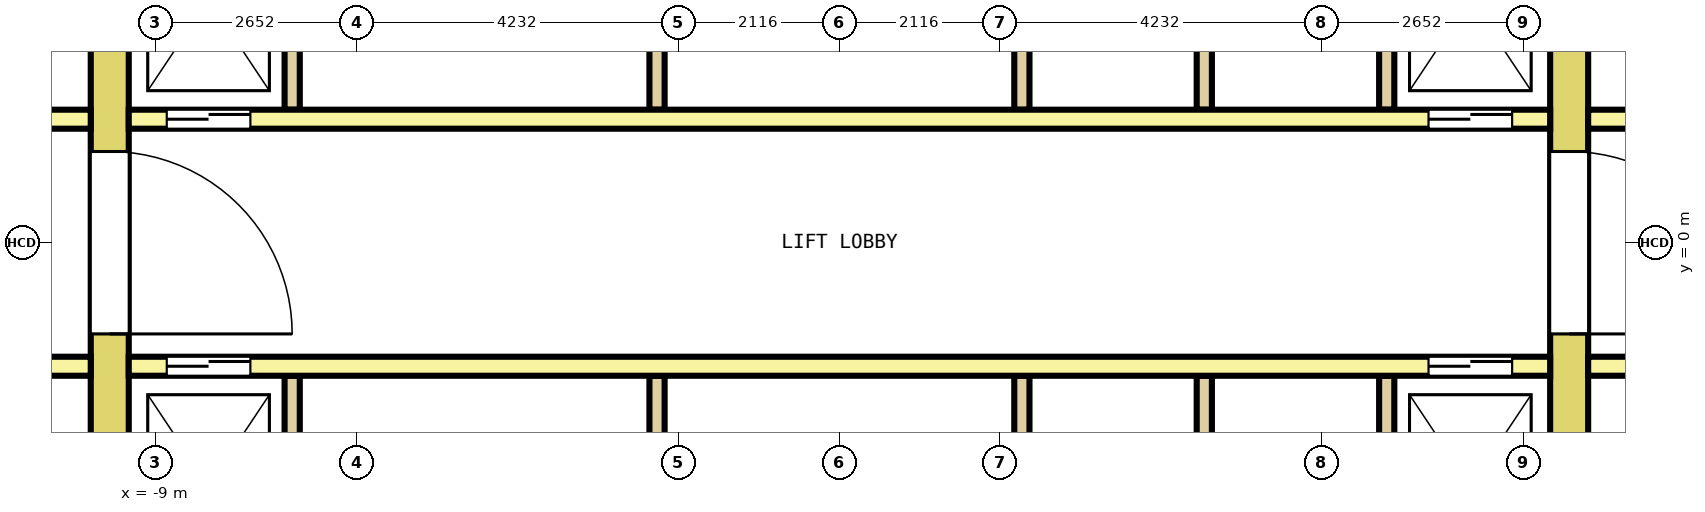
"""IFC4 building model, lengths in metres.
Left out: names, types, materials, properties, quantities, classifications, styles, units other than length and angle.
Written with IfcOpenShell. Run it as: python <this file> out.ifc"""

import sys

from ifc_helpers import new_model, si_unit, direction, frame, frame_2d, origin, place, context, subcontext, project, spatial, rectangle, extrude, element, fill, save


model = new_model("IFC4")
c1 = context("Model", 3, precision=1e-05, world=origin(), true_north=direction((0.0, 1.0)))
c2 = subcontext(c1, "Body", "Model", "MODEL_VIEW")
j1 = project(units=[si_unit("LENGTHUNIT", "METRE"), si_unit("PLANEANGLEUNIT", "RADIAN")], contexts=[c1])
p1 = place(None, origin())
s1 = spatial("IfcSite", under=j1, at=p1, CompositionType="ELEMENT")
p2 = place(p1, origin())
s2 = spatial("IfcBuilding", under=s1, at=p2, CompositionType="ELEMENT")
p3 = place(p2, frame((0.0, 0.0, 102.8)))
s3 = spatial("IfcBuildingStorey", under=s2, at=p3, CompositionType="ELEMENT", Elevation=102.8)
p4 = place(p3, frame((-9.6, -7.7, 0.0), z_axis=(0.0, 0.0, 1.0), x_axis=(0.0, 1.0, 0.0)))
e1 = element("IfcWall", 1, at=p4, inside=s3, PredefinedType="SHEAR", context=c2, shape_type="SweptSolid", body=[
    extrude(rectangle(XDim=15.4, YDim=0.5, at=frame_2d((7.7, 0.0))), origin(), (0.0, 0.0, 1.0), 4.1),
])
p5 = place(p4, frame((6.5, 0.0, 0.0)))
e2 = element("IfcOpeningElement", 2, at=p5, cuts=e1, PredefinedType="OPENING", context=c2, shape_type="SweptSolid", body=[
    extrude(rectangle(XDim=2.4, YDim=2.1, at=frame_2d((1.2, 1.05))), frame((0.0, 0.26, 0.0), z_axis=(0.0, -1.0, 0.0), x_axis=(1.0, 0.0, 0.0)), (0.0, 0.0, 1.0), 0.52),
])
p6 = place(p4, frame((13.4, 0.0, 0.0)))
e3 = element("IfcOpeningElement", 3, at=p6, cuts=e1, PredefinedType="OPENING", context=c2, shape_type="SweptSolid", body=[
    extrude(rectangle(XDim=1.2, YDim=2.1, at=frame_2d((0.6, 1.05))), frame((0.0, 0.26, 0.0), z_axis=(0.0, -1.0, 0.0), x_axis=(1.0, 0.0, 0.0)), (0.0, 0.0, 1.0), 0.52),
])
p7 = place(p4, frame((0.8, 0.0, 0.0)))
e4 = element("IfcOpeningElement", 4, at=p7, cuts=e1, PredefinedType="OPENING", context=c2, shape_type="SweptSolid", body=[
    extrude(rectangle(XDim=1.2, YDim=2.1, at=frame_2d((0.6, 1.05))), frame((0.0, 0.26, 0.0), z_axis=(0.0, -1.0, 0.0), x_axis=(1.0, 0.0, 0.0)), (0.0, 0.0, 1.0), 0.52),
])
p8 = place(p3, frame((9.6, -7.7, 0.0), z_axis=(0.0, 0.0, 1.0), x_axis=(0.0, 1.0, 0.0)))
e5 = element("IfcWall", 5, at=p8, inside=s3, PredefinedType="SHEAR", context=c2, shape_type="SweptSolid", body=[
    extrude(rectangle(XDim=15.4, YDim=0.5, at=frame_2d((7.7, 0.0))), origin(), (0.0, 0.0, 1.0), 4.1),
])
p9 = place(p8, frame((6.5, 0.0, 0.0)))
e6 = element("IfcOpeningElement", 6, at=p9, cuts=e5, PredefinedType="OPENING", context=c2, shape_type="SweptSolid", body=[
    extrude(rectangle(XDim=2.4, YDim=2.1, at=frame_2d((1.2, 1.05))), frame((0.0, 0.26, 0.0), z_axis=(0.0, -1.0, 0.0), x_axis=(1.0, 0.0, 0.0)), (0.0, 0.0, 1.0), 0.52),
])
p10 = place(p8, frame((13.4, 0.0, 0.0)))
e7 = element("IfcOpeningElement", 7, at=p10, cuts=e5, PredefinedType="OPENING", context=c2, shape_type="SweptSolid", body=[
    extrude(rectangle(XDim=1.2, YDim=2.1, at=frame_2d((0.6, 1.05))), frame((0.0, 0.26, 0.0), z_axis=(0.0, -1.0, 0.0), x_axis=(1.0, 0.0, 0.0)), (0.0, 0.0, 1.0), 0.52),
])
p11 = place(p8, frame((0.9, 0.0, 0.0)))
e8 = element("IfcOpeningElement", 8, at=p11, cuts=e5, PredefinedType="OPENING", context=c2, shape_type="SweptSolid", body=[
    extrude(rectangle(XDim=1.0, YDim=2.1, at=frame_2d((0.5, 1.05))), frame((0.0, 0.26, 0.0), z_axis=(0.0, -1.0, 0.0), x_axis=(1.0, 0.0, 0.0)), (0.0, 0.0, 1.0), 0.52),
])
p12 = place(p3, frame((-12.8, 1.625, 0.0), z_axis=(0.0, 0.0, 1.0), x_axis=(1.0, 0.0, 0.0)))
e9 = element("IfcWall", 9, at=p12, inside=s3, PredefinedType="SOLIDWALL", context=c2, shape_type="SweptSolid", body=[
    extrude(rectangle(XDim=2.95, YDim=0.25, at=frame_2d((1.475, 0.0))), origin(), (0.0, 0.0, 1.0), 4.1),
])
p13 = place(p12, frame((0.925, 0.0, 0.0)))
e10 = element("IfcOpeningElement", 10, at=p13, cuts=e9, PredefinedType="OPENING", context=c2, shape_type="SweptSolid", body=[
    extrude(rectangle(XDim=1.1, YDim=2.1, at=frame_2d((0.55, 1.05))), frame((0.0, 0.135, 0.0), z_axis=(0.0, -1.0, 0.0), x_axis=(1.0, 0.0, 0.0)), (0.0, 0.0, 1.0), 0.27),
])
p14 = place(p3, frame((-9.35, 1.625, 0.0), z_axis=(0.0, 0.0, 1.0), x_axis=(1.0, 0.0, 0.0)))
e11 = element("IfcWall", 11, at=p14, inside=s3, PredefinedType="SOLIDWALL", context=c2, shape_type="SweptSolid", body=[
    extrude(rectangle(XDim=18.7, YDim=0.25, at=frame_2d((9.35, 0.0))), origin(), (0.0, 0.0, 1.0), 4.1),
])
p15 = place(p14, frame((0.5, 0.0, 0.0)))
e12 = element("IfcOpeningElement", 12, at=p15, cuts=e11, PredefinedType="OPENING", context=c2, shape_type="SweptSolid", body=[
    extrude(rectangle(XDim=1.1, YDim=2.1, at=frame_2d((0.55, 1.05))), frame((0.0, 0.135, 0.0), z_axis=(0.0, -1.0, 0.0), x_axis=(1.0, 0.0, 0.0)), (0.0, 0.0, 1.0), 0.27),
])
p16 = place(p14, frame((17.1, 0.0, 0.0)))
e13 = element("IfcOpeningElement", 13, at=p16, cuts=e11, PredefinedType="OPENING", context=c2, shape_type="SweptSolid", body=[
    extrude(rectangle(XDim=1.1, YDim=2.1, at=frame_2d((0.55, 1.05))), frame((0.0, 0.135, 0.0), z_axis=(0.0, -1.0, 0.0), x_axis=(1.0, 0.0, 0.0)), (0.0, 0.0, 1.0), 0.27),
])
p17 = place(p3, frame((9.85, 1.625, 0.0), z_axis=(0.0, 0.0, 1.0), x_axis=(1.0, 0.0, 0.0)))
e14 = element("IfcWall", 14, at=p17, inside=s3, PredefinedType="SOLIDWALL", context=c2, shape_type="SweptSolid", body=[
    extrude(rectangle(XDim=2.95, YDim=0.25, at=frame_2d((1.475, 0.0))), origin(), (0.0, 0.0, 1.0), 4.1),
])
p18 = place(p17, frame((0.925, 0.0, 0.0)))
e15 = element("IfcOpeningElement", 15, at=p18, cuts=e14, PredefinedType="OPENING", context=c2, shape_type="SweptSolid", body=[
    extrude(rectangle(XDim=1.1, YDim=2.1, at=frame_2d((0.55, 1.05))), frame((0.0, 0.135, 0.0), z_axis=(0.0, -1.0, 0.0), x_axis=(1.0, 0.0, 0.0)), (0.0, 0.0, 1.0), 0.27),
])
for number, where, z_axis, x_axis in (
    (16, (-7.2, 1.75, 0.0), (0.0, 0.0, 1.0), (0.0, 1.0, 0.0)),
    (17, (-2.4, 1.75, 0.0), (0.0, 0.0, 1.0), (0.0, 1.0, 0.0)),
    (18, (2.4, 1.75, 0.0), (0.0, 0.0, 1.0), (0.0, 1.0, 0.0)),
    (19, (4.8, 1.75, 0.0), (0.0, 0.0, 1.0), (0.0, 1.0, 0.0)),
    (20, (7.2, 1.75, 0.0), (0.0, 0.0, 1.0), (0.0, 1.0, 0.0)),
):
    element("IfcWall", number, at=place(p3, frame(where, z_axis=z_axis, x_axis=x_axis)), inside=s3, PredefinedType="SOLIDWALL", context=c2, shape_type="SweptSolid", body=[
        extrude(rectangle(XDim=2.9, YDim=0.2, at=frame_2d((1.45, 0.0))), origin(), (0.0, 0.0, 1.0), 4.1),
    ])
p19 = place(p3, frame((-12.8, -1.625, 0.0), z_axis=(0.0, 0.0, 1.0), x_axis=(1.0, 0.0, 0.0)))
e21 = element("IfcWall", 21, at=p19, inside=s3, PredefinedType="SOLIDWALL", context=c2, shape_type="SweptSolid", body=[
    extrude(rectangle(XDim=2.95, YDim=0.25, at=frame_2d((1.475, 0.0))), origin(), (0.0, 0.0, 1.0), 4.1),
])
p20 = place(p19, frame((0.925, 0.0, 0.0)))
e22 = element("IfcOpeningElement", 22, at=p20, cuts=e21, PredefinedType="OPENING", context=c2, shape_type="SweptSolid", body=[
    extrude(rectangle(XDim=1.1, YDim=2.1, at=frame_2d((0.55, 1.05))), frame((0.0, 0.135, 0.0), z_axis=(0.0, -1.0, 0.0), x_axis=(1.0, 0.0, 0.0)), (0.0, 0.0, 1.0), 0.27),
])
p21 = place(p3, frame((-9.35, -1.625, 0.0), z_axis=(0.0, 0.0, 1.0), x_axis=(1.0, 0.0, 0.0)))
e23 = element("IfcWall", 23, at=p21, inside=s3, PredefinedType="SOLIDWALL", context=c2, shape_type="SweptSolid", body=[
    extrude(rectangle(XDim=18.7, YDim=0.25, at=frame_2d((9.35, 0.0))), origin(), (0.0, 0.0, 1.0), 4.1),
])
p22 = place(p21, frame((0.5, 0.0, 0.0)))
e24 = element("IfcOpeningElement", 24, at=p22, cuts=e23, PredefinedType="OPENING", context=c2, shape_type="SweptSolid", body=[
    extrude(rectangle(XDim=1.1, YDim=2.1, at=frame_2d((0.55, 1.05))), frame((0.0, 0.135, 0.0), z_axis=(0.0, -1.0, 0.0), x_axis=(1.0, 0.0, 0.0)), (0.0, 0.0, 1.0), 0.27),
])
p23 = place(p21, frame((17.1, 0.0, 0.0)))
e25 = element("IfcOpeningElement", 25, at=p23, cuts=e23, PredefinedType="OPENING", context=c2, shape_type="SweptSolid", body=[
    extrude(rectangle(XDim=1.1, YDim=2.1, at=frame_2d((0.55, 1.05))), frame((0.0, 0.135, 0.0), z_axis=(0.0, -1.0, 0.0), x_axis=(1.0, 0.0, 0.0)), (0.0, 0.0, 1.0), 0.27),
])
p24 = place(p3, frame((9.85, -1.625, 0.0), z_axis=(0.0, 0.0, 1.0), x_axis=(1.0, 0.0, 0.0)))
e26 = element("IfcWall", 26, at=p24, inside=s3, PredefinedType="SOLIDWALL", context=c2, shape_type="SweptSolid", body=[
    extrude(rectangle(XDim=2.95, YDim=0.25, at=frame_2d((1.475, 0.0))), origin(), (0.0, 0.0, 1.0), 4.1),
])
p25 = place(p24, frame((0.925, 0.0, 0.0)))
e27 = element("IfcOpeningElement", 27, at=p25, cuts=e26, PredefinedType="OPENING", context=c2, shape_type="SweptSolid", body=[
    extrude(rectangle(XDim=1.1, YDim=2.1, at=frame_2d((0.55, 1.05))), frame((0.0, 0.135, 0.0), z_axis=(0.0, -1.0, 0.0), x_axis=(1.0, 0.0, 0.0)), (0.0, 0.0, 1.0), 0.27),
])
for number, where, z_axis, x_axis in (
    (28, (-7.2, -4.65, 0.0), (0.0, 0.0, 1.0), (0.0, 1.0, 0.0)),
    (29, (-2.4, -4.65, 0.0), (0.0, 0.0, 1.0), (0.0, 1.0, 0.0)),
    (30, (2.4, -4.65, 0.0), (0.0, 0.0, 1.0), (0.0, 1.0, 0.0)),
    (31, (4.8, -4.65, 0.0), (0.0, 0.0, 1.0), (0.0, 1.0, 0.0)),
    (32, (7.2, -4.65, 0.0), (0.0, 0.0, 1.0), (0.0, 1.0, 0.0)),
):
    element("IfcWall", number, at=place(p3, frame(where, z_axis=z_axis, x_axis=x_axis)), inside=s3, PredefinedType="SOLIDWALL", context=c2, shape_type="SweptSolid", body=[
        extrude(rectangle(XDim=2.9, YDim=0.2, at=frame_2d((1.45, 0.0))), origin(), (0.0, 0.0, 1.0), 4.1),
    ])
p26 = place(p15, origin())
e33 = element("IfcDoor", 33, at=p26, inside=s3, OperationType="DOUBLE_DOOR_SLIDING", PredefinedType="DOOR", context=c2, shape_type="SweptSolid", body=[
    extrude(rectangle(XDim=1.1, YDim=2.1, at=frame_2d((0.55, 1.05))), frame((0.0, 0.075, 0.0), z_axis=(0.0, -1.0, 0.0), x_axis=(1.0, 0.0, 0.0)), (0.0, 0.0, 1.0), 0.15),
])
fill(e12, e33)
p27 = place(p16, origin())
e34 = element("IfcDoor", 34, at=p27, inside=s3, OperationType="DOUBLE_DOOR_SLIDING", PredefinedType="DOOR", context=c2, shape_type="SweptSolid", body=[
    extrude(rectangle(XDim=1.1, YDim=2.1, at=frame_2d((0.55, 1.05))), frame((0.0, 0.075, 0.0), z_axis=(0.0, -1.0, 0.0), x_axis=(1.0, 0.0, 0.0)), (0.0, 0.0, 1.0), 0.15),
])
fill(e13, e34)
p28 = place(p22, origin())
e35 = element("IfcDoor", 35, at=p28, inside=s3, OperationType="DOUBLE_DOOR_SLIDING", PredefinedType="DOOR", context=c2, shape_type="SweptSolid", body=[
    extrude(rectangle(XDim=1.1, YDim=2.1, at=frame_2d((0.55, 1.05))), frame((0.0, 0.075, 0.0), z_axis=(0.0, -1.0, 0.0), x_axis=(1.0, 0.0, 0.0)), (0.0, 0.0, 1.0), 0.15),
])
fill(e24, e35)
p29 = place(p23, origin())
e36 = element("IfcDoor", 36, at=p29, inside=s3, OperationType="DOUBLE_DOOR_SLIDING", PredefinedType="DOOR", context=c2, shape_type="SweptSolid", body=[
    extrude(rectangle(XDim=1.1, YDim=2.1, at=frame_2d((0.55, 1.05))), frame((0.0, 0.075, 0.0), z_axis=(0.0, -1.0, 0.0), x_axis=(1.0, 0.0, 0.0)), (0.0, 0.0, 1.0), 0.15),
])
fill(e25, e36)
p30 = place(p5, origin())
e37 = element("IfcDoor", 37, at=p30, inside=s3, OperationType="DOUBLE_DOOR_SINGLE_SWING", PredefinedType="DOOR", context=c2, shape_type="SweptSolid", body=[
    extrude(rectangle(XDim=2.4, YDim=2.1, at=frame_2d((1.2, 1.05))), frame((0.0, 0.2, 0.0), z_axis=(0.0, -1.0, 0.0), x_axis=(1.0, 0.0, 0.0)), (0.0, 0.0, 1.0), 0.4),
])
fill(e2, e37)
p31 = place(p9, origin())
e38 = element("IfcDoor", 38, at=p31, inside=s3, OperationType="DOUBLE_DOOR_SINGLE_SWING", PredefinedType="DOOR", context=c2, shape_type="SweptSolid", body=[
    extrude(rectangle(XDim=2.4, YDim=2.1, at=frame_2d((1.2, 1.05))), frame((0.0, 0.2, 0.0), z_axis=(0.0, -1.0, 0.0), x_axis=(1.0, 0.0, 0.0)), (0.0, 0.0, 1.0), 0.4),
])
fill(e6, e38)
save(model, sys.argv[1])
